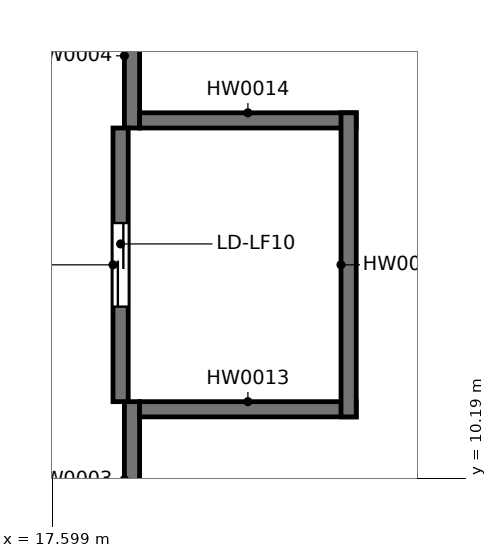
"""IFC4 building model, lengths in metres.
Left out: names, types, materials, properties, quantities, classifications, styles, units other than length and angle.
Written with IfcOpenShell. Run it as: python <this file> out.ifc"""

import sys

from ifc_helpers import new_model, si_unit, direction, frame, frame_2d, origin, place, context, subcontext, project, spatial, rectangle, extrude, element, fill, save


model = new_model("IFC4")
c1 = context("Model", 3, precision=1e-05, world=origin(), true_north=direction((0.0, 1.0)))
c2 = subcontext(c1, "Body", "Model", "MODEL_VIEW")
j1 = project(units=[si_unit("LENGTHUNIT", "METRE"), si_unit("PLANEANGLEUNIT", "RADIAN")], contexts=[c1])
p1 = place(None, origin())
s1 = spatial("IfcSite", under=j1, at=p1, CompositionType="ELEMENT")
p2 = place(p1, origin())
s2 = spatial("IfcBuilding", under=s1, at=p2, CompositionType="ELEMENT")
p3 = place(p2, frame((0.0, 0.0, 19.2)))
s3 = spatial("IfcBuildingStorey", under=s2, at=p3, CompositionType="ELEMENT", Elevation=19.2)
p4 = place(p3, frame((18.65, 9.15, 0.0), z_axis=(0.0, 0.0, 1.0), x_axis=(0.0, 1.0, 0.0)))
e1 = element("IfcWall", 1, at=p4, inside=s3, PredefinedType="SOLIDWALL", context=c2, shape_type="SweptSolid", body=[
    extrude(rectangle(XDim=2.05, YDim=0.2, at=frame_2d((1.025, 0.0))), origin(), (0.0, 0.0, 1.0), 3.3),
])
p5 = place(p3, frame((18.65, 14.8, 0.0), z_axis=(0.0, 0.0, 1.0), x_axis=(0.0, 1.0, 0.0)))
e2 = element("IfcWall", 2, at=p5, inside=s3, PredefinedType="SOLIDWALL", context=c2, shape_type="SweptSolid", body=[
    extrude(rectangle(XDim=1.9, YDim=0.2, at=frame_2d((0.95, 0.0))), origin(), (0.0, 0.0, 1.0), 3.3),
])
for number, where, z_axis, x_axis in (
    (3, (18.75, 11.1, 0.0), (0.0, 0.0, 1.0), (1.0, 0.0, 0.0)),
    (4, (18.75, 14.9, 0.0), (0.0, 0.0, 1.0), (1.0, 0.0, 0.0)),
):
    element("IfcWall", number, at=place(p3, frame(where, z_axis=z_axis, x_axis=x_axis)), inside=s3, PredefinedType="SOLIDWALL", context=c2, shape_type="SweptSolid", body=[
        extrude(rectangle(XDim=2.85, YDim=0.2, at=frame_2d((1.425, 0.0))), origin(), (0.0, 0.0, 1.0), 3.3),
    ])
p6 = place(p3, frame((21.5, 11.0, 0.0), z_axis=(0.0, 0.0, 1.0), x_axis=(0.0, 1.0, 0.0)))
e5 = element("IfcWall", 5, at=p6, inside=s3, PredefinedType="SOLIDWALL", context=c2, shape_type="SweptSolid", body=[
    extrude(rectangle(XDim=4.0, YDim=0.2, at=frame_2d((2.0, 0.0))), origin(), (0.0, 0.0, 1.0), 3.3),
])
p7 = place(p3, frame((18.5, 11.2, 0.0), z_axis=(0.0, 0.0, 1.0), x_axis=(0.0, 1.0, 0.0)))
e6 = element("IfcWall", 6, at=p7, inside=s3, PredefinedType="SOLIDWALL", context=c2, shape_type="SweptSolid", body=[
    extrude(rectangle(XDim=3.6, YDim=0.2, at=frame_2d((1.8, 0.0))), origin(), (0.0, 0.0, 1.0), 3.3),
])
p8 = place(p7, frame((1.25, 0.0, 0.0)))
e7 = element("IfcOpeningElement", 7, at=p8, cuts=e6, PredefinedType="OPENING", context=c2, shape_type="SweptSolid", body=[
    extrude(rectangle(XDim=1.1, YDim=2.1, at=frame_2d((0.55, 1.05))), frame((0.0, 0.11, 0.0), z_axis=(0.0, -1.0, 0.0), x_axis=(1.0, 0.0, 0.0)), (0.0, 0.0, 1.0), 0.22),
])
p9 = place(p8, origin())
e8 = element("IfcDoor", 8, at=p9, inside=s3, OperationType="SLIDING_TO_LEFT", PredefinedType="DOOR", context=c2, shape_type="SweptSolid", body=[
    extrude(rectangle(XDim=1.1, YDim=2.1, at=frame_2d((0.55, 1.05))), frame((0.0, 0.025, 0.0), z_axis=(0.0, -1.0, 0.0), x_axis=(1.0, 0.0, 0.0)), (0.0, 0.0, 1.0), 0.05),
])
fill(e7, e8)
save(model, sys.argv[1])
